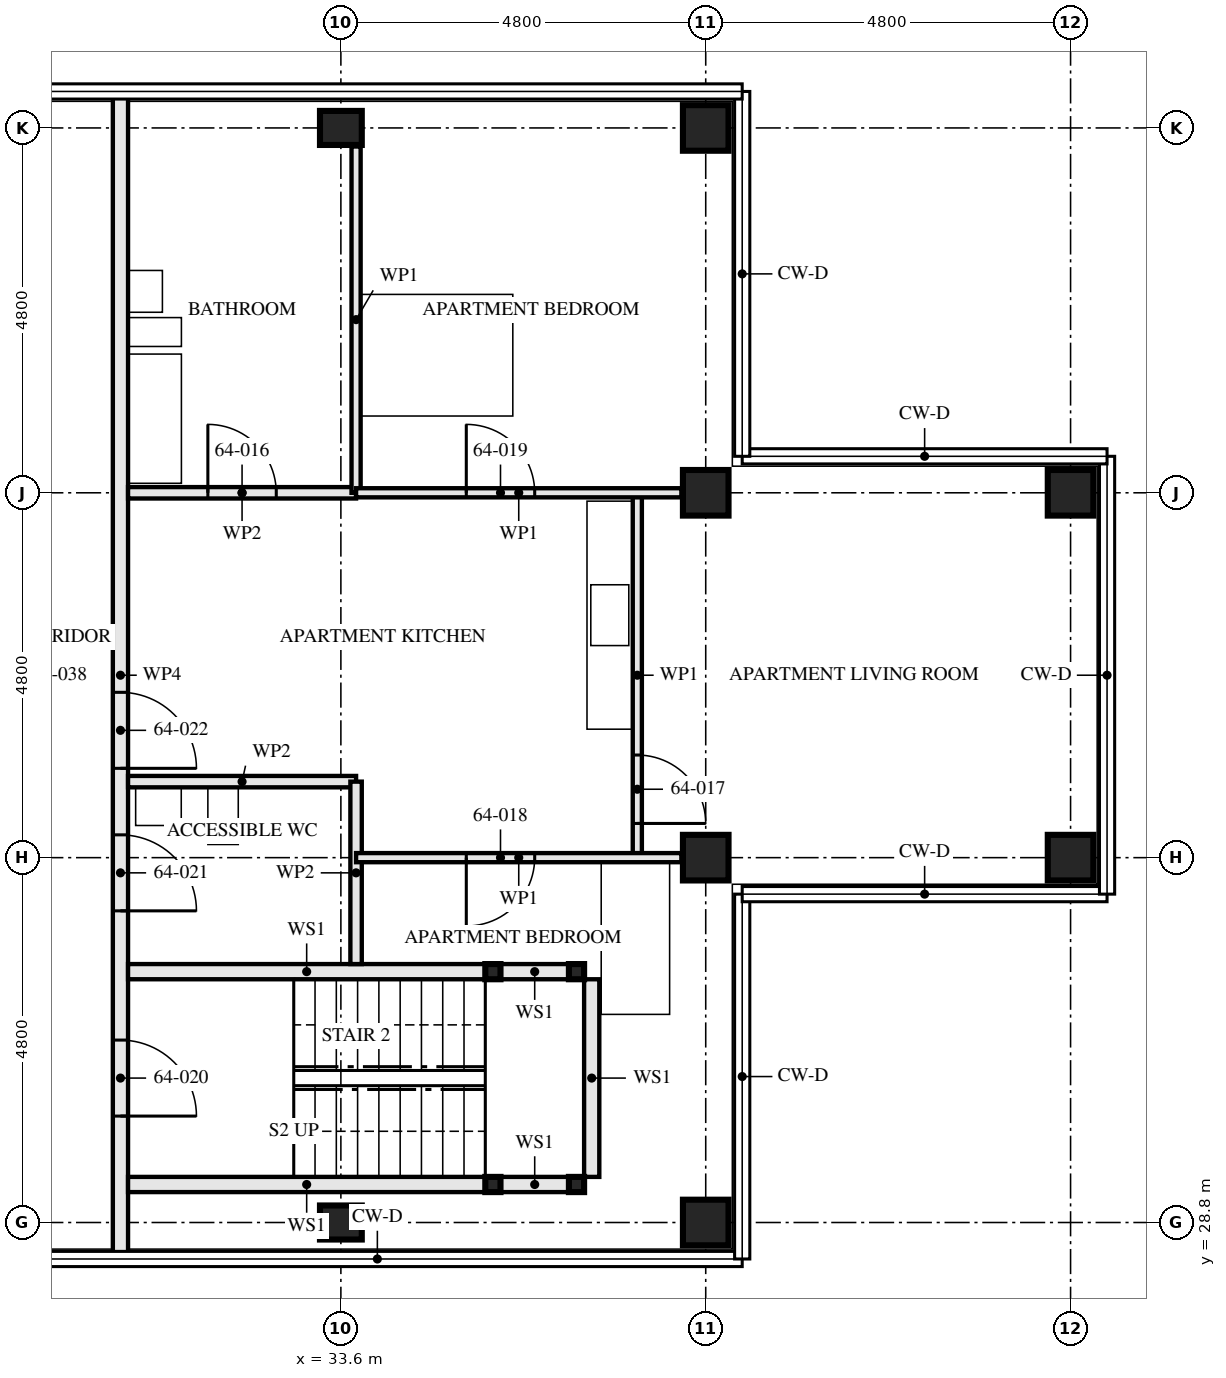
"""IFC4 building model, lengths in metres.
Left out: names, types, materials, properties, quantities, classifications, styles, units other than length and angle.
Written with IfcOpenShell. Run it as: python <this file> out.ifc"""

import sys

from ifc_helpers import new_model, si_unit, direction, frame, frame_2d, origin, origin_2d, place, context, subcontext, project, spatial, rectangle, hollow_rectangle, i_section, extrude, element, fill, save


model = new_model("IFC4")
c1 = context("Model", 3, precision=1e-05, world=origin(), true_north=direction((0.0, 1.0)))
c2 = subcontext(c1, "Body", "Model", "MODEL_VIEW")
j1 = project(units=[si_unit("LENGTHUNIT", "METRE"), si_unit("PLANEANGLEUNIT", "RADIAN")], contexts=[c1])
p1 = place(None, origin())
s1 = spatial("IfcSite", under=j1, at=p1, CompositionType="ELEMENT")
p2 = place(p1, origin())
s2 = spatial("IfcBuilding", under=s1, at=p2, CompositionType="ELEMENT")
p3 = place(p2, frame((0.0, 0.0, 233.0)))
s3 = spatial("IfcBuildingStorey", under=s2, at=p3, CompositionType="ELEMENT", Elevation=233.0)
for number, where, z_axis, x_axis in (
    (1, (33.6, 28.8, 0.0), (0.0, 0.0, 1.0), (0.0, 1.0, 0.0)),
    (2, (33.6, 43.2, 0.0), (0.0, 0.0, 1.0), (0.0, 1.0, 0.0)),
):
    element("IfcColumn", number, at=place(p3, frame(where, z_axis=z_axis, x_axis=x_axis)), inside=s3, PredefinedType="COLUMN", context=c2, shape_type="SweptSolid", body=[
        extrude(i_section(OverallWidth=0.448, OverallDepth=0.55, WebThickness=0.072, FlangeThickness=0.115, FilletRadius=0.015, at=origin_2d()), origin(), (0.0, 0.0, 1.0), 3.5),
    ])
for number, where, z_axis, x_axis in (
    (3, (38.4, 28.8, 0.0), (0.0, 0.0, 1.0), (0.0, 1.0, 0.0)),
    (4, (38.4, 33.6, 0.0), (0.0, 0.0, 1.0), (0.0, 1.0, 0.0)),
    (5, (38.4, 38.4, 0.0), (0.0, 0.0, 1.0), (0.0, 1.0, 0.0)),
    (6, (38.4, 43.2, 0.0), (0.0, 0.0, 1.0), (0.0, 1.0, 0.0)),
    (7, (43.2, 33.6, 0.0), (0.0, 0.0, 1.0), (0.0, 1.0, 0.0)),
    (8, (43.2, 38.4, 0.0), (0.0, 0.0, 1.0), (0.0, 1.0, 0.0)),
):
    element("IfcColumn", number, at=place(p3, frame(where, z_axis=z_axis, x_axis=x_axis)), inside=s3, PredefinedType="COLUMN", context=c2, shape_type="SweptSolid", body=[
        extrude(hollow_rectangle(XDim=0.6, YDim=0.6, WallThickness=0.05, at=origin_2d()), origin(), (0.0, 0.0, 1.0), 3.5),
    ])
for number, where, z_axis, x_axis in (
    (9, (36.7, 29.3, 0.0), (0.0, 0.0, 1.0), (1.0, 0.0, 0.0)),
    (10, (36.7, 32.1, 0.0), (0.0, 0.0, 1.0), (1.0, 0.0, 0.0)),
    (11, (35.6, 29.3, 0.0), (0.0, 0.0, 1.0), (1.0, 0.0, 0.0)),
    (12, (35.6, 32.1, 0.0), (0.0, 0.0, 1.0), (1.0, 0.0, 0.0)),
):
    element("IfcColumn", number, at=place(p3, frame(where, z_axis=z_axis, x_axis=x_axis)), inside=s3, PredefinedType="COLUMN", context=c2, shape_type="SweptSolid", body=[
        extrude(hollow_rectangle(XDim=0.2, YDim=0.2, WallThickness=0.008, at=origin_2d()), origin(), (0.0, 0.0, 1.0), 3.33),
    ])
p4 = place(p3, frame((36.6, 29.3, 0.0), z_axis=(0.0, 0.0, 1.0), x_axis=(-1.0, 0.0, 0.0)))
e13 = element("IfcWall", 13, at=p4, inside=s3, PredefinedType="SOLIDWALL", context=c2, shape_type="SweptSolid", body=[
    extrude(rectangle(XDim=0.9, YDim=0.2, at=frame_2d((0.45, 0.0))), origin(), (0.0, 0.0, 1.0), 2.99),
])
p5 = place(p3, frame((35.5, 29.3, 0.0), z_axis=(0.0, 0.0, 1.0), x_axis=(-1.0, 0.0, 0.0)))
e14 = element("IfcWall", 14, at=p5, inside=s3, PredefinedType="SOLIDWALL", context=c2, shape_type="SweptSolid", body=[
    extrude(rectangle(XDim=4.7, YDim=0.2, at=frame_2d((2.35, 0.0))), origin(), (0.0, 0.0, 1.0), 2.99),
])
p6 = place(p3, frame((36.6, 32.1, 0.0), z_axis=(0.0, 0.0, 1.0), x_axis=(-1.0, 0.0, 0.0)))
e15 = element("IfcWall", 15, at=p6, inside=s3, PredefinedType="SOLIDWALL", context=c2, shape_type="SweptSolid", body=[
    extrude(rectangle(XDim=0.9, YDim=0.2, at=frame_2d((0.45, 0.0))), origin(), (0.0, 0.0, 1.0), 2.99),
])
p7 = place(p3, frame((35.5, 32.1, 0.0), z_axis=(0.0, 0.0, 1.0), x_axis=(-1.0, 0.0, 0.0)))
e16 = element("IfcWall", 16, at=p7, inside=s3, PredefinedType="SOLIDWALL", context=c2, shape_type="SweptSolid", body=[
    extrude(rectangle(XDim=4.7, YDim=0.2, at=frame_2d((2.35, 0.0))), origin(), (0.0, 0.0, 1.0), 2.99),
])
p8 = place(p3, frame((36.9, 29.4, 0.0), z_axis=(0.0, 0.0, 1.0), x_axis=(0.0, 1.0, 0.0)))
e17 = element("IfcWall", 17, at=p8, inside=s3, PredefinedType="SOLIDWALL", context=c2, shape_type="SweptSolid", body=[
    extrude(rectangle(XDim=2.6, YDim=0.2, at=frame_2d((1.3, 0.0))), origin(), (0.0, 0.0, 1.0), 3.33),
])
p9 = place(p3, frame((33.8, 32.2, 0.0), z_axis=(0.0, 0.0, 1.0), x_axis=(0.0, 1.0, 0.0)))
e18 = element("IfcWall", 18, at=p9, inside=s3, PredefinedType="PARTITIONING", context=c2, shape_type="SweptSolid", body=[
    extrude(rectangle(XDim=2.4, YDim=0.15, at=frame_2d((1.2, 0.0))), origin(), (0.0, 0.0, 1.0), 2.55),
])
p10 = place(p3, frame((33.8, 34.6, 0.0), z_axis=(0.0, 0.0, 1.0), x_axis=(-1.0, 0.0, 0.0)))
e19 = element("IfcWall", 19, at=p10, inside=s3, PredefinedType="PARTITIONING", context=c2, shape_type="SweptSolid", body=[
    extrude(rectangle(XDim=3.0, YDim=0.15, at=frame_2d((1.5, 0.0))), origin(), (0.0, 0.0, 1.0), 3.33),
])
p11 = place(p3, frame((33.8, 38.4, 0.0), z_axis=(0.0, 0.0, 1.0), x_axis=(-1.0, 0.0, 0.0)))
e20 = element("IfcWall", 20, at=p11, inside=s3, PredefinedType="PARTITIONING", context=c2, shape_type="SweptSolid", body=[
    extrude(rectangle(XDim=3.0, YDim=0.15, at=frame_2d((1.5, 0.0))), origin(), (0.0, 0.0, 1.0), 2.55),
])
p12 = place(p11, frame((1.05, 0.0, 0.0)))
e21 = element("IfcOpeningElement", 21, at=p12, cuts=e20, PredefinedType="OPENING", context=c2, shape_type="SweptSolid", body=[
    extrude(rectangle(XDim=0.9, YDim=2.1, at=frame_2d((0.45, 1.05))), frame((0.0, 0.085, 0.0), z_axis=(0.0, -1.0, 0.0), x_axis=(1.0, 0.0, 0.0)), (0.0, 0.0, 1.0), 0.171),
])
p13 = place(p3, frame((37.5, 33.6, 0.0), z_axis=(0.0, 0.0, 1.0), x_axis=(0.0, 1.0, 0.0)))
e22 = element("IfcWall", 22, at=p13, inside=s3, PredefinedType="PARTITIONING", context=c2, shape_type="SweptSolid", body=[
    extrude(rectangle(XDim=4.8, YDim=0.12, at=frame_2d((2.4, 0.0))), origin(), (0.0, 0.0, 1.0), 3.33),
])
p14 = place(p13, frame((0.45, 0.0, 0.0)))
e23 = element("IfcOpeningElement", 23, at=p14, cuts=e22, PredefinedType="OPENING", context=c2, shape_type="SweptSolid", body=[
    extrude(rectangle(XDim=0.9, YDim=2.1, at=frame_2d((0.45, 1.05))), frame((0.0, 0.071, 0.0), z_axis=(0.0, -1.0, 0.0), x_axis=(1.0, 0.0, 0.0)), (0.0, 0.0, 1.0), 0.141),
])
p15 = place(p3, frame((33.8, 38.4, 0.0), z_axis=(0.0, 0.0, 1.0), x_axis=(0.0, 1.0, 0.0)))
e24 = element("IfcWall", 24, at=p15, inside=s3, PredefinedType="PARTITIONING", context=c2, shape_type="SweptSolid", body=[
    extrude(rectangle(XDim=4.556, YDim=0.12, at=frame_2d((2.278, 0.0))), origin(), (0.0, 0.0, 1.0), 3.33),
])
p16 = place(p3, frame((38.08, 33.6, 0.0), z_axis=(0.0, 0.0, 1.0), x_axis=(-1.0, 0.0, 0.0)))
e25 = element("IfcWall", 25, at=p16, inside=s3, PredefinedType="PARTITIONING", context=c2, shape_type="SweptSolid", body=[
    extrude(rectangle(XDim=4.28, YDim=0.12, at=frame_2d((2.14, 0.0))), origin(), (0.0, 0.0, 1.0), 2.55),
])
p17 = place(p16, frame((1.93, 0.0, 0.0)))
e26 = element("IfcOpeningElement", 26, at=p17, cuts=e25, PredefinedType="OPENING", context=c2, shape_type="SweptSolid", body=[
    extrude(rectangle(XDim=0.9, YDim=2.1, at=frame_2d((0.45, 1.05))), frame((0.0, 0.071, 0.0), z_axis=(0.0, -1.0, 0.0), x_axis=(1.0, 0.0, 0.0)), (0.0, 0.0, 1.0), 0.141),
])
p18 = place(p3, frame((38.08, 38.4, 0.0), z_axis=(0.0, 0.0, 1.0), x_axis=(-1.0, 0.0, 0.0)))
e27 = element("IfcWall", 27, at=p18, inside=s3, PredefinedType="PARTITIONING", context=c2, shape_type="SweptSolid", body=[
    extrude(rectangle(XDim=4.28, YDim=0.12, at=frame_2d((2.14, 0.0))), origin(), (0.0, 0.0, 1.0), 2.55),
])
p19 = place(p18, frame((1.93, 0.0, 0.0)))
e28 = element("IfcOpeningElement", 28, at=p19, cuts=e27, PredefinedType="OPENING", context=c2, shape_type="SweptSolid", body=[
    extrude(rectangle(XDim=0.9, YDim=2.1, at=frame_2d((0.45, 1.05))), frame((0.0, 0.071, 0.0), z_axis=(0.0, -1.0, 0.0), x_axis=(1.0, 0.0, 0.0)), (0.0, 0.0, 1.0), 0.141),
])
p20 = place(p3, frame((30.7, 28.345, 0.0), z_axis=(0.0, 0.0, 1.0), x_axis=(0.0, 1.0, 0.0)))
e29 = element("IfcWall", 29, at=p20, inside=s3, PredefinedType="PARTITIONING", context=c2, shape_type="SweptSolid", body=[
    extrude(rectangle(XDim=15.31, YDim=0.2, at=frame_2d((7.655, 0.0))), origin(), (0.0, 0.0, 1.0), 2.32),
])
p21 = place(p20, frame((1.855, 0.0, 0.0)))
e30 = element("IfcOpeningElement", 30, at=p21, cuts=e29, PredefinedType="OPENING", context=c2, shape_type="SweptSolid", body=[
    extrude(rectangle(XDim=1.0, YDim=2.1, at=frame_2d((0.5, 1.05))), frame((0.0, 0.111, 0.0), z_axis=(0.0, -1.0, 0.0), x_axis=(1.0, 0.0, 0.0)), (0.0, 0.0, 1.0), 0.221),
])
p22 = place(p20, frame((4.555, 0.0, 0.0)))
e31 = element("IfcOpeningElement", 31, at=p22, cuts=e29, PredefinedType="OPENING", context=c2, shape_type="SweptSolid", body=[
    extrude(rectangle(XDim=1.0, YDim=2.1, at=frame_2d((0.5, 1.05))), frame((0.0, 0.111, 0.0), z_axis=(0.0, -1.0, 0.0), x_axis=(1.0, 0.0, 0.0)), (0.0, 0.0, 1.0), 0.221),
])
p23 = place(p20, frame((6.43, 0.0, 0.0)))
e32 = element("IfcOpeningElement", 32, at=p23, cuts=e29, PredefinedType="OPENING", context=c2, shape_type="SweptSolid", body=[
    extrude(rectangle(XDim=1.0, YDim=2.1, at=frame_2d((0.5, 1.05))), frame((0.0, 0.111, 0.0), z_axis=(0.0, -1.0, 0.0), x_axis=(1.0, 0.0, 0.0)), (0.0, 0.0, 1.0), 0.221),
])
p24 = place(p12, frame((0.9, 0.0, 0.0), z_axis=(0.0, 0.0, 1.0), x_axis=(-1.0, 0.0, 0.0)))
e33 = element("IfcDoor", 33, at=p24, inside=s3, OperationType="SINGLE_SWING_RIGHT", PredefinedType="DOOR", context=c2, shape_type="SweptSolid", body=[
    extrude(rectangle(XDim=0.9, YDim=2.1, at=frame_2d((0.45, 1.05))), frame((0.0, 0.022, 0.0), z_axis=(0.0, -1.0, 0.0), x_axis=(1.0, 0.0, 0.0)), (0.0, 0.0, 1.0), 0.044),
])
fill(e21, e33)
p25 = place(p14, frame((0.9, 0.0, 0.0), z_axis=(0.0, 0.0, 1.0), x_axis=(-1.0, 0.0, 0.0)))
e34 = element("IfcDoor", 34, at=p25, inside=s3, OperationType="SINGLE_SWING_LEFT", PredefinedType="DOOR", context=c2, shape_type="SweptSolid", body=[
    extrude(rectangle(XDim=0.9, YDim=2.1, at=frame_2d((0.45, 1.05))), frame((0.0, 0.022, 0.0), z_axis=(0.0, -1.0, 0.0), x_axis=(1.0, 0.0, 0.0)), (0.0, 0.0, 1.0), 0.044),
])
fill(e23, e34)
p26 = place(p17, origin())
e35 = element("IfcDoor", 35, at=p26, inside=s3, OperationType="SINGLE_SWING_LEFT", PredefinedType="DOOR", context=c2, shape_type="SweptSolid", body=[
    extrude(rectangle(XDim=0.9, YDim=2.1, at=frame_2d((0.45, 1.05))), frame((0.0, 0.022, 0.0), z_axis=(0.0, -1.0, 0.0), x_axis=(1.0, 0.0, 0.0)), (0.0, 0.0, 1.0), 0.044),
])
fill(e26, e35)
p27 = place(p19, frame((0.9, 0.0, 0.0), z_axis=(0.0, 0.0, 1.0), x_axis=(-1.0, 0.0, 0.0)))
e36 = element("IfcDoor", 36, at=p27, inside=s3, OperationType="SINGLE_SWING_RIGHT", PredefinedType="DOOR", context=c2, shape_type="SweptSolid", body=[
    extrude(rectangle(XDim=0.9, YDim=2.1, at=frame_2d((0.45, 1.05))), frame((0.0, 0.022, 0.0), z_axis=(0.0, -1.0, 0.0), x_axis=(1.0, 0.0, 0.0)), (0.0, 0.0, 1.0), 0.044),
])
fill(e28, e36)
p28 = place(p21, frame((1.0, 0.0, 0.0), z_axis=(0.0, 0.0, 1.0), x_axis=(-1.0, 0.0, 0.0)))
e37 = element("IfcDoor", 37, at=p28, inside=s3, OperationType="SINGLE_SWING_LEFT", PredefinedType="DOOR", context=c2, shape_type="SweptSolid", body=[
    extrude(rectangle(XDim=1.0, YDim=2.1, at=frame_2d((0.5, 1.05))), frame((0.0, 0.032, 0.0), z_axis=(0.0, -1.0, 0.0), x_axis=(1.0, 0.0, 0.0)), (0.0, 0.0, 1.0), 0.064),
])
fill(e30, e37)
p29 = place(p22, frame((1.0, 0.0, 0.0), z_axis=(0.0, 0.0, 1.0), x_axis=(-1.0, 0.0, 0.0)))
e38 = element("IfcDoor", 38, at=p29, inside=s3, OperationType="SINGLE_SWING_LEFT", PredefinedType="DOOR", context=c2, shape_type="SweptSolid", body=[
    extrude(rectangle(XDim=1.0, YDim=2.1, at=frame_2d((0.5, 1.05))), frame((0.0, 0.027, 0.0), z_axis=(0.0, -1.0, 0.0), x_axis=(1.0, 0.0, 0.0)), (0.0, 0.0, 1.0), 0.054),
])
fill(e31, e38)
p30 = place(p23, frame((1.0, 0.0, 0.0), z_axis=(0.0, 0.0, 1.0), x_axis=(-1.0, 0.0, 0.0)))
e39 = element("IfcDoor", 39, at=p30, inside=s3, OperationType="SINGLE_SWING_LEFT", PredefinedType="DOOR", context=c2, shape_type="SweptSolid", body=[
    extrude(rectangle(XDim=1.0, YDim=2.1, at=frame_2d((0.5, 1.05))), frame((0.0, 0.027, 0.0), z_axis=(0.0, -1.0, 0.0), x_axis=(1.0, 0.0, 0.0)), (0.0, 0.0, 1.0), 0.054),
])
fill(e32, e39)
save(model, sys.argv[1])
